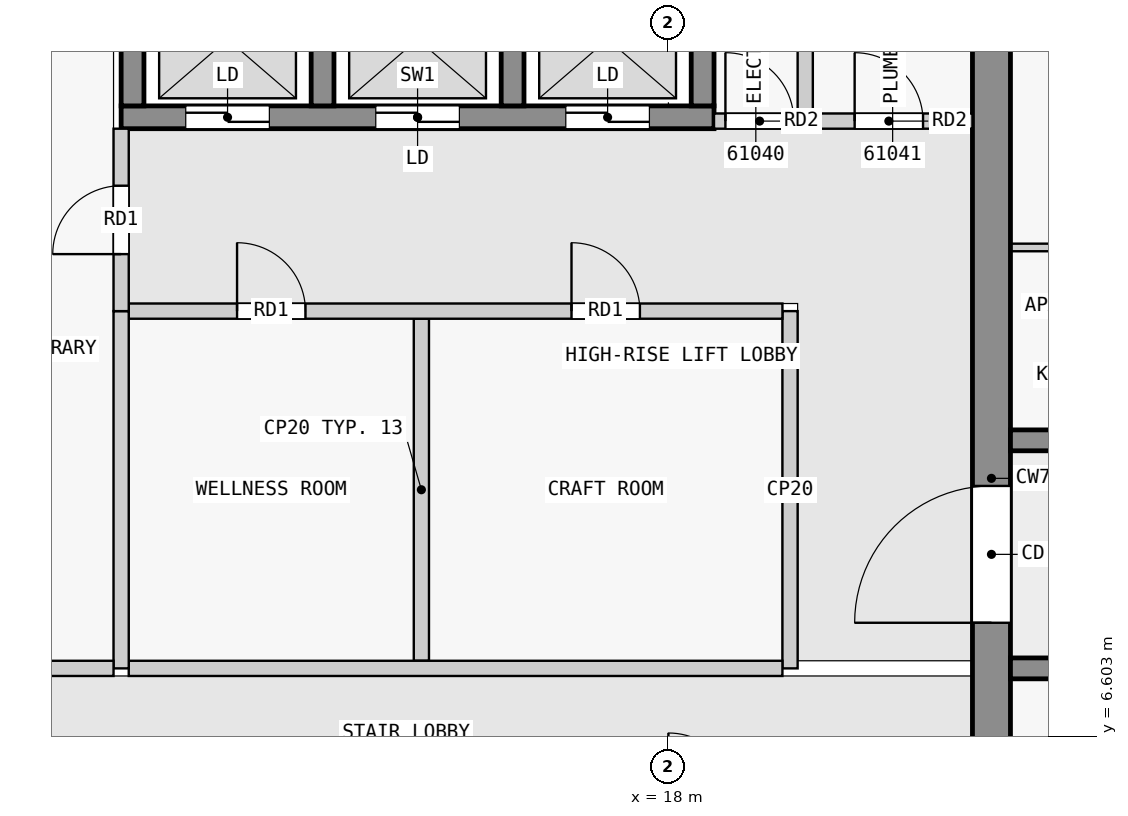
"""IFC4 building model, lengths in metres.
Left out: names, types, materials, properties, quantities, classifications, styles, units other than length and angle.
Written with IfcOpenShell. Run it as: python <this file> out.ifc"""

import sys

from ifc_helpers import new_model, si_unit, direction, frame, frame_2d, origin, place, context, subcontext, project, spatial, rectangle, extrude, element, fill, save


model = new_model("IFC4")
c1 = context("Model", 3, precision=1e-05, world=origin(), true_north=direction((0.0, 1.0)))
c2 = subcontext(c1, "Body", "Model", "MODEL_VIEW")
j1 = project(units=[si_unit("LENGTHUNIT", "METRE"), si_unit("PLANEANGLEUNIT", "RADIAN")], contexts=[c1])
p1 = place(None, origin())
s1 = spatial("IfcSite", under=j1, at=p1, CompositionType="ELEMENT")
p2 = place(p1, origin())
s2 = spatial("IfcBuilding", under=s1, at=p2, CompositionType="ELEMENT")
p3 = place(p2, frame((0.0, 0.0, 232.9)))
s3 = spatial("IfcBuildingStorey", under=s2, at=p3, CompositionType="ELEMENT", Elevation=232.9)
p4 = place(p3, frame((22.25, 2.5, 0.0), z_axis=(0.0, 0.0, 1.0), x_axis=(0.0, 1.0, 0.0)))
e1 = element("IfcWall", 1, at=p4, inside=s3, PredefinedType="SHEAR", context=c2, shape_type="SweptSolid", body=[
    extrude(rectangle(XDim=15.0, YDim=0.5, at=frame_2d((7.5, 0.0))), origin(), (0.0, 0.0, 1.0), 3.2),
])
p5 = place(p4, frame((5.6, 0.0, 0.0)))
e2 = element("IfcOpeningElement", 2, at=p5, cuts=e1, PredefinedType="OPENING", context=c2, shape_type="SweptSolid", body=[
    extrude(rectangle(XDim=1.8, YDim=2.1, at=frame_2d((0.9, 1.05))), frame((0.0, 0.26, 0.0), z_axis=(0.0, -1.0, 0.0), x_axis=(1.0, 0.0, 0.0)), (0.0, 0.0, 1.0), 0.52),
])
p6 = place(p3, frame((10.8, 14.75, 0.0), z_axis=(0.0, 0.0, 1.0), x_axis=(1.0, 0.0, 0.0)))
e3 = element("IfcWall", 3, at=p6, inside=s3, PredefinedType="SHEAR", context=c2, shape_type="SweptSolid", body=[
    extrude(rectangle(XDim=7.8, YDim=0.3, at=frame_2d((3.9, 0.0))), origin(), (0.0, 0.0, 1.0), 3.2),
])
p7 = place(p6, frame((0.85, 0.0, 0.0)))
e4 = element("IfcOpeningElement", 4, at=p7, cuts=e3, PredefinedType="OPENING", context=c2, shape_type="SweptSolid", body=[
    extrude(rectangle(XDim=1.1, YDim=2.1, at=frame_2d((0.55, 1.05))), frame((0.0, 0.16, 0.0), z_axis=(0.0, -1.0, 0.0), x_axis=(1.0, 0.0, 0.0)), (0.0, 0.0, 1.0), 0.32),
])
p8 = place(p6, frame((3.35, 0.0, 0.0)))
e5 = element("IfcOpeningElement", 5, at=p8, cuts=e3, PredefinedType="OPENING", context=c2, shape_type="SweptSolid", body=[
    extrude(rectangle(XDim=1.1, YDim=2.1, at=frame_2d((0.55, 1.05))), frame((0.0, 0.16, 0.0), z_axis=(0.0, -1.0, 0.0), x_axis=(1.0, 0.0, 0.0)), (0.0, 0.0, 1.0), 0.32),
])
p9 = place(p6, frame((5.85, 0.0, 0.0)))
e6 = element("IfcOpeningElement", 6, at=p9, cuts=e3, PredefinedType="OPENING", context=c2, shape_type="SweptSolid", body=[
    extrude(rectangle(XDim=1.1, YDim=2.1, at=frame_2d((0.55, 1.05))), frame((0.0, 0.16, 0.0), z_axis=(0.0, -1.0, 0.0), x_axis=(1.0, 0.0, 0.0)), (0.0, 0.0, 1.0), 0.32),
])
for number, where, z_axis, x_axis in (
    (7, (10.95, 14.9, 0.0), (0.0, 0.0, 1.0), (0.0, 1.0, 0.0)),
    (8, (13.45, 14.9, 0.0), (0.0, 0.0, 1.0), (0.0, 1.0, 0.0)),
    (9, (15.95, 14.9, 0.0), (0.0, 0.0, 1.0), (0.0, 1.0, 0.0)),
    (10, (18.45, 14.9, 0.0), (0.0, 0.0, 1.0), (0.0, 1.0, 0.0)),
):
    element("IfcWall", number, at=place(p3, frame(where, z_axis=z_axis, x_axis=x_axis)), inside=s3, PredefinedType="SHEAR", context=c2, shape_type="SweptSolid", body=[
        extrude(rectangle(XDim=2.0, YDim=0.3, at=frame_2d((1.0, 0.0))), origin(), (0.0, 0.0, 1.0), 3.2),
    ])
p10 = place(p3, frame((22.5, 7.5, 0.0), z_axis=(0.0, 0.0, 1.0), x_axis=(1.0, 0.0, 0.0)))
e11 = element("IfcWall", 11, at=p10, inside=s3, PredefinedType="SHEAR", context=c2, shape_type="SweptSolid", body=[
    extrude(rectangle(XDim=22.5, YDim=0.275, at=frame_2d((11.25, 0.0))), origin(), (0.0, 0.0, 1.0), 3.2),
])
p11 = place(p10, frame((1.75, 0.0, 0.0)))
e12 = element("IfcOpeningElement", 12, at=p11, cuts=e11, PredefinedType="OPENING", context=c2, shape_type="SweptSolid", body=[
    extrude(rectangle(XDim=1.0, YDim=2.1, at=frame_2d((0.5, 1.05))), frame((0.0, 0.147, 0.0), z_axis=(0.0, -1.0, 0.0), x_axis=(1.0, 0.0, 0.0)), (0.0, 0.0, 1.0), 0.295),
])
p12 = place(p10, frame((5.85, 0.0, 0.0)))
e13 = element("IfcOpeningElement", 13, at=p12, cuts=e11, PredefinedType="OPENING", context=c2, shape_type="SweptSolid", body=[
    extrude(rectangle(XDim=1.8, YDim=2.1, at=frame_2d((0.9, 1.05))), frame((0.0, 0.147, 0.0), z_axis=(0.0, -1.0, 0.0), x_axis=(1.0, 0.0, 0.0)), (0.0, 0.0, 1.0), 0.295),
])
p13 = place(p10, frame((10.75, 0.0, 0.0)))
e14 = element("IfcOpeningElement", 14, at=p13, cuts=e11, PredefinedType="OPENING", context=c2, shape_type="SweptSolid", body=[
    extrude(rectangle(XDim=1.0, YDim=2.1, at=frame_2d((0.5, 1.05))), frame((0.0, 0.147, 0.0), z_axis=(0.0, -1.0, 0.0), x_axis=(1.0, 0.0, 0.0)), (0.0, 0.0, 1.0), 0.295),
])
p14 = place(p10, frame((16.85, 0.0, 0.0)))
e15 = element("IfcOpeningElement", 15, at=p14, cuts=e11, PredefinedType="OPENING", context=c2, shape_type="SweptSolid", body=[
    extrude(rectangle(XDim=1.0, YDim=2.1, at=frame_2d((0.5, 1.05))), frame((0.0, 0.147, 0.0), z_axis=(0.0, -1.0, 0.0), x_axis=(1.0, 0.0, 0.0)), (0.0, 0.0, 1.0), 0.295),
])
p15 = place(p3, frame((22.5, 10.5, 0.0), z_axis=(0.0, 0.0, 1.0), x_axis=(1.0, 0.0, 0.0)))
e16 = element("IfcWall", 16, at=p15, inside=s3, PredefinedType="SHEAR", context=c2, shape_type="SweptSolid", body=[
    extrude(rectangle(XDim=22.5, YDim=0.275, at=frame_2d((11.25, 0.0))), origin(), (0.0, 0.0, 1.0), 3.2),
])
p16 = place(p15, frame((4.05, 0.0, 0.0)))
e17 = element("IfcOpeningElement", 17, at=p16, cuts=e16, PredefinedType="OPENING", context=c2, shape_type="SweptSolid", body=[
    extrude(rectangle(XDim=1.0, YDim=2.1, at=frame_2d((0.5, 1.05))), frame((0.0, 0.147, 0.0), z_axis=(0.0, -1.0, 0.0), x_axis=(1.0, 0.0, 0.0)), (0.0, 0.0, 1.0), 0.295),
])
p17 = place(p15, frame((10.75, 0.0, 0.0)))
e18 = element("IfcOpeningElement", 18, at=p17, cuts=e16, PredefinedType="OPENING", context=c2, shape_type="SweptSolid", body=[
    extrude(rectangle(XDim=1.0, YDim=2.1, at=frame_2d((0.5, 1.05))), frame((0.0, 0.147, 0.0), z_axis=(0.0, -1.0, 0.0), x_axis=(1.0, 0.0, 0.0)), (0.0, 0.0, 1.0), 0.295),
])
p18 = place(p15, frame((15.25, 0.0, 0.0)))
e19 = element("IfcOpeningElement", 19, at=p18, cuts=e16, PredefinedType="OPENING", context=c2, shape_type="SweptSolid", body=[
    extrude(rectangle(XDim=1.0, YDim=2.1, at=frame_2d((0.5, 1.05))), frame((0.0, 0.147, 0.0), z_axis=(0.0, -1.0, 0.0), x_axis=(1.0, 0.0, 0.0)), (0.0, 0.0, 1.0), 0.295),
])
p19 = place(p15, frame((18.75, 0.0, 0.0)))
e20 = element("IfcOpeningElement", 20, at=p19, cuts=e16, PredefinedType="OPENING", context=c2, shape_type="SweptSolid", body=[
    extrude(rectangle(XDim=0.9, YDim=2.1, at=frame_2d((0.45, 1.05))), frame((0.0, 0.147, 0.0), z_axis=(0.0, -1.0, 0.0), x_axis=(1.0, 0.0, 0.0)), (0.0, 0.0, 1.0), 0.295),
])
p20 = place(p15, frame((20.95, 0.0, 0.0)))
e21 = element("IfcOpeningElement", 21, at=p20, cuts=e16, PredefinedType="OPENING", context=c2, shape_type="SweptSolid", body=[
    extrude(rectangle(XDim=1.0, YDim=2.1, at=frame_2d((0.5, 1.05))), frame((0.0, 0.147, 0.0), z_axis=(0.0, -1.0, 0.0), x_axis=(1.0, 0.0, 0.0)), (0.0, 0.0, 1.0), 0.295),
])
p21 = place(p3, frame((7.1, 7.5, 0.0), z_axis=(0.0, 0.0, 1.0), x_axis=(1.0, 0.0, 0.0)))
e22 = element("IfcWall", 22, at=p21, inside=s3, PredefinedType="PARTITIONING", context=c2, shape_type="SweptSolid", body=[
    extrude(rectangle(XDim=3.6, YDim=0.2, at=frame_2d((1.8, 0.0))), origin(), (0.0, 0.0, 1.0), 3.2),
])
p22 = place(p3, frame((10.8, 12.2, 0.0), z_axis=(0.0, 0.0, 1.0), x_axis=(0.0, 1.0, 0.0)))
e23 = element("IfcWall", 23, at=p22, inside=s3, PredefinedType="PARTITIONING", context=c2, shape_type="SweptSolid", body=[
    extrude(rectangle(XDim=2.4, YDim=0.2, at=frame_2d((1.2, 0.0))), origin(), (0.0, 0.0, 1.0), 3.2),
])
p23 = place(p22, frame((0.75, 0.0, 0.0)))
e24 = element("IfcOpeningElement", 24, at=p23, cuts=e23, PredefinedType="OPENING", context=c2, shape_type="SweptSolid", body=[
    extrude(rectangle(XDim=0.9, YDim=2.1, at=frame_2d((0.45, 1.05))), frame((0.0, 0.11, 0.0), z_axis=(0.0, -1.0, 0.0), x_axis=(1.0, 0.0, 0.0)), (0.0, 0.0, 1.0), 0.22),
])
p24 = place(p3, frame((10.8, 7.5, 0.0), z_axis=(0.0, 0.0, 1.0), x_axis=(0.0, 1.0, 0.0)))
e25 = element("IfcWall", 25, at=p24, inside=s3, PredefinedType="PARTITIONING", context=c2, shape_type="SweptSolid", body=[
    extrude(rectangle(XDim=4.7, YDim=0.2, at=frame_2d((2.35, 0.0))), origin(), (0.0, 0.0, 1.0), 3.2),
])
p25 = place(p3, frame((10.9, 7.5, 0.0), z_axis=(0.0, 0.0, 1.0), x_axis=(1.0, 0.0, 0.0)))
e26 = element("IfcWall", 26, at=p25, inside=s3, PredefinedType="PARTITIONING", context=c2, shape_type="SweptSolid", body=[
    extrude(rectangle(XDim=8.6, YDim=0.2, at=frame_2d((4.3, 0.0))), origin(), (0.0, 0.0, 1.0), 3.2),
])
p26 = place(p3, frame((19.6, 7.5, 0.0), z_axis=(0.0, 0.0, 1.0), x_axis=(0.0, 1.0, 0.0)))
e27 = element("IfcWall", 27, at=p26, inside=s3, PredefinedType="PARTITIONING", context=c2, shape_type="SweptSolid", body=[
    extrude(rectangle(XDim=4.7, YDim=0.2, at=frame_2d((2.35, 0.0))), origin(), (0.0, 0.0, 1.0), 3.2),
])
p27 = place(p3, frame((10.9, 12.2, 0.0), z_axis=(0.0, 0.0, 1.0), x_axis=(1.0, 0.0, 0.0)))
e28 = element("IfcWall", 28, at=p27, inside=s3, PredefinedType="PARTITIONING", context=c2, shape_type="SweptSolid", body=[
    extrude(rectangle(XDim=8.6, YDim=0.2, at=frame_2d((4.3, 0.0))), origin(), (0.0, 0.0, 1.0), 3.2),
])
p28 = place(p27, frame((1.425, 0.0, 0.0)))
e29 = element("IfcOpeningElement", 29, at=p28, cuts=e28, PredefinedType="OPENING", context=c2, shape_type="SweptSolid", body=[
    extrude(rectangle(XDim=0.9, YDim=2.1, at=frame_2d((0.45, 1.05))), frame((0.0, 0.11, 0.0), z_axis=(0.0, -1.0, 0.0), x_axis=(1.0, 0.0, 0.0)), (0.0, 0.0, 1.0), 0.22),
])
p29 = place(p27, frame((5.825, 0.0, 0.0)))
e30 = element("IfcOpeningElement", 30, at=p29, cuts=e28, PredefinedType="OPENING", context=c2, shape_type="SweptSolid", body=[
    extrude(rectangle(XDim=0.9, YDim=2.1, at=frame_2d((0.45, 1.05))), frame((0.0, 0.11, 0.0), z_axis=(0.0, -1.0, 0.0), x_axis=(1.0, 0.0, 0.0)), (0.0, 0.0, 1.0), 0.22),
])
p30 = place(p3, frame((14.75, 7.6, 0.0), z_axis=(0.0, 0.0, 1.0), x_axis=(0.0, 1.0, 0.0)))
e31 = element("IfcWall", 31, at=p30, inside=s3, PredefinedType="PARTITIONING", context=c2, shape_type="SweptSolid", body=[
    extrude(rectangle(XDim=4.5, YDim=0.2, at=frame_2d((2.25, 0.0))), origin(), (0.0, 0.0, 1.0), 3.2),
])
p31 = place(p3, frame((18.6, 14.7, 0.0), z_axis=(0.0, 0.0, 1.0), x_axis=(1.0, 0.0, 0.0)))
e32 = element("IfcWall", 32, at=p31, inside=s3, PredefinedType="PARTITIONING", context=c2, shape_type="SweptSolid", body=[
    extrude(rectangle(XDim=3.4, YDim=0.2, at=frame_2d((1.7, 0.0))), origin(), (0.0, 0.0, 1.0), 3.2),
])
p32 = place(p31, frame((0.15, 0.0, 0.0)))
e33 = element("IfcOpeningElement", 33, at=p32, cuts=e32, PredefinedType="OPENING", context=c2, shape_type="SweptSolid", body=[
    extrude(rectangle(XDim=0.9, YDim=2.1, at=frame_2d((0.45, 1.05))), frame((0.0, 0.11, 0.0), z_axis=(0.0, -1.0, 0.0), x_axis=(1.0, 0.0, 0.0)), (0.0, 0.0, 1.0), 0.22),
])
p33 = place(p31, frame((1.85, 0.0, 0.0)))
e34 = element("IfcOpeningElement", 34, at=p33, cuts=e32, PredefinedType="OPENING", context=c2, shape_type="SweptSolid", body=[
    extrude(rectangle(XDim=0.9, YDim=2.1, at=frame_2d((0.45, 1.05))), frame((0.0, 0.11, 0.0), z_axis=(0.0, -1.0, 0.0), x_axis=(1.0, 0.0, 0.0)), (0.0, 0.0, 1.0), 0.22),
])
p34 = place(p3, frame((19.8, 14.8, 0.0), z_axis=(0.0, 0.0, 1.0), x_axis=(0.0, 1.0, 0.0)))
e35 = element("IfcWall", 35, at=p34, inside=s3, PredefinedType="PARTITIONING", context=c2, shape_type="SweptSolid", body=[
    extrude(rectangle(XDim=2.7, YDim=0.2, at=frame_2d((1.35, 0.0))), origin(), (0.0, 0.0, 1.0), 3.2),
])
p35 = place(p3, frame((24.25, 13.038, 0.0), z_axis=(0.0, 0.0, 1.0), x_axis=(-1.0, 0.0, 0.0)))
e36 = element("IfcWall", 36, at=p35, inside=s3, PredefinedType="PARTITIONING", context=c2, shape_type="SweptSolid", body=[
    extrude(rectangle(XDim=1.75, YDim=0.1, at=frame_2d((0.875, 0.0))), origin(), (0.0, 0.0, 1.0), 3.2),
])
p36 = place(p23, origin())
e37 = element("IfcDoor", 37, at=p36, inside=s3, OperationType="SINGLE_SWING_LEFT", PredefinedType="DOOR", context=c2, shape_type="SweptSolid", body=[
    extrude(rectangle(XDim=0.9, YDim=2.1, at=frame_2d((0.45, 1.05))), frame((0.0, 0.025, 0.0), z_axis=(0.0, -1.0, 0.0), x_axis=(1.0, 0.0, 0.0)), (0.0, 0.0, 1.0), 0.05),
])
fill(e24, e37)
p37 = place(p28, origin())
e38 = element("IfcDoor", 38, at=p37, inside=s3, OperationType="SINGLE_SWING_LEFT", PredefinedType="DOOR", context=c2, shape_type="SweptSolid", body=[
    extrude(rectangle(XDim=0.9, YDim=2.1, at=frame_2d((0.45, 1.05))), frame((0.0, 0.025, 0.0), z_axis=(0.0, -1.0, 0.0), x_axis=(1.0, 0.0, 0.0)), (0.0, 0.0, 1.0), 0.05),
])
fill(e29, e38)
p38 = place(p29, origin())
e39 = element("IfcDoor", 39, at=p38, inside=s3, OperationType="SINGLE_SWING_LEFT", PredefinedType="DOOR", context=c2, shape_type="SweptSolid", body=[
    extrude(rectangle(XDim=0.9, YDim=2.1, at=frame_2d((0.45, 1.05))), frame((0.0, 0.025, 0.0), z_axis=(0.0, -1.0, 0.0), x_axis=(1.0, 0.0, 0.0)), (0.0, 0.0, 1.0), 0.05),
])
fill(e30, e39)
p39 = place(p7, origin())
e40 = element("IfcDoor", 40, at=p39, inside=s3, OperationType="DOUBLE_DOOR_SLIDING", PredefinedType="DOOR", context=c2, shape_type="SweptSolid", body=[
    extrude(rectangle(XDim=1.1, YDim=2.1, at=frame_2d((0.55, 1.05))), frame((0.0, 0.025, 0.0), z_axis=(0.0, -1.0, 0.0), x_axis=(1.0, 0.0, 0.0)), (0.0, 0.0, 1.0), 0.05),
])
fill(e4, e40)
p40 = place(p8, origin())
e41 = element("IfcDoor", 41, at=p40, inside=s3, OperationType="DOUBLE_DOOR_SLIDING", PredefinedType="DOOR", context=c2, shape_type="SweptSolid", body=[
    extrude(rectangle(XDim=1.1, YDim=2.1, at=frame_2d((0.55, 1.05))), frame((0.0, 0.025, 0.0), z_axis=(0.0, -1.0, 0.0), x_axis=(1.0, 0.0, 0.0)), (0.0, 0.0, 1.0), 0.05),
])
fill(e5, e41)
p41 = place(p9, origin())
e42 = element("IfcDoor", 42, at=p41, inside=s3, OperationType="DOUBLE_DOOR_SLIDING", PredefinedType="DOOR", context=c2, shape_type="SweptSolid", body=[
    extrude(rectangle(XDim=1.1, YDim=2.1, at=frame_2d((0.55, 1.05))), frame((0.0, 0.025, 0.0), z_axis=(0.0, -1.0, 0.0), x_axis=(1.0, 0.0, 0.0)), (0.0, 0.0, 1.0), 0.05),
])
fill(e6, e42)
p42 = place(p5, origin())
e43 = element("IfcDoor", 43, at=p42, inside=s3, OperationType="DOUBLE_DOOR_SINGLE_SWING", PredefinedType="DOOR", context=c2, shape_type="SweptSolid", body=[
    extrude(rectangle(XDim=1.8, YDim=2.1, at=frame_2d((0.9, 1.05))), frame((0.0, 0.025, 0.0), z_axis=(0.0, -1.0, 0.0), x_axis=(1.0, 0.0, 0.0)), (0.0, 0.0, 1.0), 0.05),
])
fill(e2, e43)
p43 = place(p32, origin())
e44 = element("IfcDoor", 44, at=p43, inside=s3, OperationType="SINGLE_SWING_LEFT", PredefinedType="DOOR", context=c2, shape_type="SweptSolid", body=[
    extrude(rectangle(XDim=0.9, YDim=2.1, at=frame_2d((0.45, 1.05))), frame((0.0, 0.025, 0.0), z_axis=(0.0, -1.0, 0.0), x_axis=(1.0, 0.0, 0.0)), (0.0, 0.0, 1.0), 0.05),
])
fill(e33, e44)
p44 = place(p33, origin())
e45 = element("IfcDoor", 45, at=p44, inside=s3, OperationType="SINGLE_SWING_LEFT", PredefinedType="DOOR", context=c2, shape_type="SweptSolid", body=[
    extrude(rectangle(XDim=0.9, YDim=2.1, at=frame_2d((0.45, 1.05))), frame((0.0, 0.025, 0.0), z_axis=(0.0, -1.0, 0.0), x_axis=(1.0, 0.0, 0.0)), (0.0, 0.0, 1.0), 0.05),
])
fill(e34, e45)
save(model, sys.argv[1])
